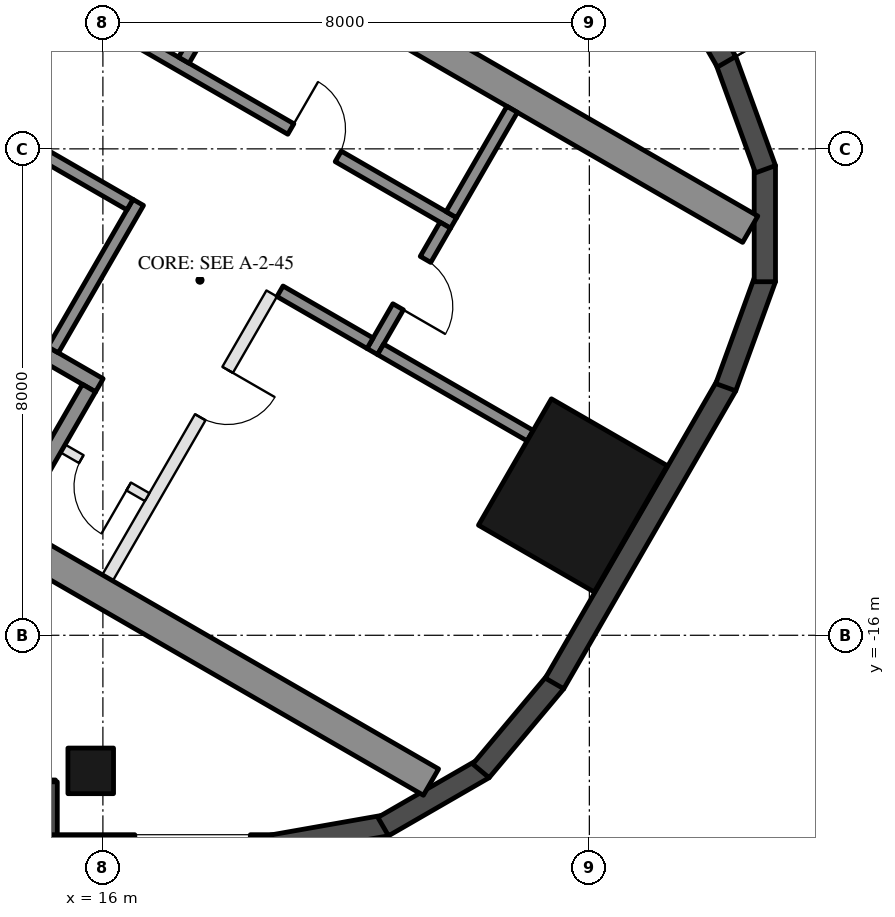
"""IFC4 building model, lengths in metres.
Left out: names, types, materials, properties, quantities, classifications, styles, units other than length and angle.
Written with IfcOpenShell. Run it as: python <this file> out.ifc"""

import sys

from ifc_helpers import new_model, si_unit, direction, frame, frame_2d, origin, origin_2d, place, context, subcontext, project, spatial, rectangle, hollow_rectangle, extrude, element, fill, save


model = new_model("IFC4")
c1 = context("Model", 3, precision=1e-05, world=origin(), true_north=direction((0.0, 1.0)))
c2 = subcontext(c1, "Body", "Model", "MODEL_VIEW")
j1 = project(units=[si_unit("LENGTHUNIT", "METRE"), si_unit("PLANEANGLEUNIT", "RADIAN")], contexts=[c1])
p1 = place(None, origin())
s1 = spatial("IfcSite", under=j1, at=p1, CompositionType="ELEMENT")
p2 = place(p1, origin())
s2 = spatial("IfcBuilding", under=s1, at=p2, CompositionType="ELEMENT")
p3 = place(p2, frame((0.0, 0.0, 191.0)))
s3 = spatial("IfcBuildingStorey", under=s2, at=p3, CompositionType="ELEMENT", Elevation=191.0)
p4 = place(p3, frame((15.8, -18.23, 0.0), z_axis=(0.0, 0.0, 1.0), x_axis=(-1.0, 0.0, 0.0)))
e1 = element("IfcColumn", 1, at=p4, inside=s3, PredefinedType="COLUMN", context=c2, shape_type="SweptSolid", body=[
    extrude(hollow_rectangle(XDim=0.75, YDim=0.75, WallThickness=0.035, at=origin_2d()), origin(), (0.0, 0.0, 1.0), 3.7),
])
p5 = place(p3, frame((23.729, -13.7, 0.0), z_axis=(0.0, 0.0, 1.0), x_axis=(0.5, 0.866025403784, 0.0)))
e2 = element("IfcColumn", 2, at=p5, inside=s3, PredefinedType="COLUMN", context=c2, shape_type="SweptSolid", body=[
    extrude(hollow_rectangle(XDim=2.4, YDim=2.2, WallThickness=0.06, at=origin_2d()), origin(), (0.0, 0.0, 1.0), 3.7),
])
p6 = place(p3, frame((8.48, -18.555, 0.0), z_axis=(0.0, 0.0, 1.0), x_axis=(1.0, 0.0, 0.0)))
e3 = element("IfcWall", 3, at=p6, inside=s3, PredefinedType="SOLIDWALL", context=c2, shape_type="SweptSolid", body=[
    extrude(rectangle(XDim=6.74, YDim=0.35, at=frame_2d((3.37, 0.0))), origin(), (0.0, 0.0, 1.0), 3.55),
])
p7 = place(p6, frame((0.32, 0.0, 0.0)))
e4 = element("IfcOpeningElement", 4, at=p7, cuts=e3, PredefinedType="OPENING", context=c2, shape_type="SweptSolid", body=[
    extrude(rectangle(XDim=2.4, YDim=2.4, at=frame_2d((1.2, 1.2))), frame((0.0, 0.185, 0.0), z_axis=(0.0, -1.0, 0.0), x_axis=(1.0, 0.0, 0.0)), (0.0, 0.0, 1.0), 0.37),
])
p8 = place(p6, frame((3.02, 0.0, 0.3)))
e5 = element("IfcOpeningElement", 5, at=p8, cuts=e3, PredefinedType="OPENING", context=c2, shape_type="SweptSolid", body=[
    extrude(rectangle(XDim=2.9, YDim=2.65, at=frame_2d((1.45, 1.325))), frame((0.0, 0.185, 0.0), z_axis=(0.0, -1.0, 0.0), x_axis=(1.0, 0.0, 0.0)), (0.0, 0.0, 1.0), 0.37),
])
p9 = place(p3, frame((15.075, -18.41, 0.0), z_axis=(0.0, 0.0, 1.0), x_axis=(0.0, -1.0, 0.0)))
e6 = element("IfcWall", 6, at=p9, inside=s3, PredefinedType="SOLIDWALL", context=c2, shape_type="SweptSolid", body=[
    extrude(rectangle(XDim=1.22, YDim=0.35, at=frame_2d((0.61, 0.0))), origin(), (0.0, 0.0, 1.0), 3.55),
])
p10 = place(p3, frame((14.9, -19.455, 0.0), z_axis=(0.0, 0.0, 1.0), x_axis=(1.0, 0.0, 0.0)))
e7 = element("IfcWall", 7, at=p10, inside=s3, PredefinedType="SOLIDWALL", context=c2, shape_type="SweptSolid", body=[
    extrude(rectangle(XDim=3.916, YDim=0.35, at=frame_2d((1.958, 0.0))), origin(), (0.0, 0.0, 1.0), 3.55),
])
p11 = place(p10, frame((1.625, 0.0, 0.3)))
e8 = element("IfcOpeningElement", 8, at=p11, cuts=e7, PredefinedType="OPENING", context=c2, shape_type="SweptSolid", body=[
    extrude(rectangle(XDim=1.9, YDim=2.65, at=frame_2d((0.95, 1.325))), frame((0.0, 0.185, 0.0), z_axis=(0.0, -1.0, 0.0), x_axis=(1.0, 0.0, 0.0)), (0.0, 0.0, 1.0), 0.37),
])
p12 = place(p3, frame((18.785, -19.458, 0.0), z_axis=(0.0, 0.0, 1.0), x_axis=(0.984798995425, 0.173697837091, 0.0)))
e9 = element("IfcWall", 9, at=p12, inside=s3, PredefinedType="SOLIDWALL", context=c2, shape_type="SweptSolid", body=[
    extrude(rectangle(XDim=1.91, YDim=0.35, at=frame_2d((0.955, 0.0))), origin(), (0.0, 0.0, 1.0), 3.55),
])
for number, where, z_axis, x_axis in (
    (10, (20.61, -19.147, 0.0), (0.0, 0.0, 1.0), (0.866, 0.5, 0.0)),
    (11, (22.217, -18.231, 0.0), (0.0, 0.0, 1.0), (0.643, 0.766, 0.0)),
):
    element("IfcWall", number, at=place(p3, frame(where, z_axis=z_axis, x_axis=x_axis)), inside=s3, PredefinedType="SOLIDWALL", context=c2, shape_type="SweptSolid", body=[
        extrude(rectangle(XDim=1.91, YDim=0.35, at=frame_2d((0.955, 0.0))), origin(), (0.0, 0.0, 1.0), 3.55),
    ])
p13 = place(p3, frame((23.427, -16.792, 0.0), z_axis=(0.0, 0.0, 1.0), x_axis=(0.500018773155, 0.866014564827, 0.0)))
e12 = element("IfcWall", 12, at=p13, inside=s3, PredefinedType="SOLIDWALL", context=c2, shape_type="SweptSolid", body=[
    extrude(rectangle(XDim=5.658, YDim=0.35, at=frame_2d((2.829, 0.0))), origin(), (0.0, 0.0, 1.0), 3.55),
])
for number, where, z_axis, x_axis in (
    (13, (26.244, -11.92, 0.0), (0.0, 0.0, 1.0), (0.342, 0.94, 0.0)),
    (14, (26.886, -10.185, 0.0), (0.0, 0.0, 1.0), (0.0, 1.0, 0.0)),
    (15, (26.897, -8.335, 0.0), (0.0, 0.0, 1.0), (-0.342, 0.94, 0.0)),
):
    element("IfcWall", number, at=place(p3, frame(where, z_axis=z_axis, x_axis=x_axis)), inside=s3, PredefinedType="SOLIDWALL", context=c2, shape_type="SweptSolid", body=[
        extrude(rectangle(XDim=1.91, YDim=0.35, at=frame_2d((0.955, 0.0))), origin(), (0.0, 0.0, 1.0), 3.55),
    ])
p14 = place(p3, frame((26.257, -6.567, 0.0), z_axis=(0.0, 0.0, 1.0), x_axis=(-0.500023526245, 0.866011820475, 0.0)))
e16 = element("IfcWall", 16, at=p14, inside=s3, PredefinedType="SOLIDWALL", context=c2, shape_type="SweptSolid", body=[
    extrude(rectangle(XDim=11.816, YDim=0.35, at=frame_2d((5.908, 0.0))), origin(), (0.0, 0.0, 1.0), 3.55),
])
p15 = place(p14, frame((0.38, 0.0, 0.3)))
e17 = element("IfcOpeningElement", 17, at=p15, cuts=e16, PredefinedType="OPENING", context=c2, shape_type="SweptSolid", body=[
    extrude(rectangle(XDim=1.9, YDim=2.65, at=frame_2d((0.95, 1.325))), frame((0.0, 0.185, 0.0), z_axis=(0.0, -1.0, 0.0), x_axis=(1.0, 0.0, 0.0)), (0.0, 0.0, 1.0), 0.37),
])
p16 = place(p14, frame((7.791, 0.0, 0.0)))
e18 = element("IfcOpeningElement", 18, at=p16, cuts=e16, PredefinedType="OPENING", context=c2, shape_type="SweptSolid", body=[
    extrude(rectangle(XDim=2.4, YDim=2.4, at=frame_2d((1.2, 1.2))), frame((0.0, 0.185, 0.0), z_axis=(0.0, -1.0, 0.0), x_axis=(1.0, 0.0, 0.0)), (0.0, 0.0, 1.0), 0.37),
])
p17 = place(p14, frame((3.741, 0.0, 0.3)))
e19 = element("IfcOpeningElement", 19, at=p17, cuts=e16, PredefinedType="OPENING", context=c2, shape_type="SweptSolid", body=[
    extrude(rectangle(XDim=1.7, YDim=2.65, at=frame_2d((0.85, 1.325))), frame((0.0, 0.185, 0.0), z_axis=(0.0, -1.0, 0.0), x_axis=(1.0, 0.0, 0.0)), (0.0, 0.0, 1.0), 0.37),
])
p18 = place(p14, frame((5.741, 0.0, 0.3)))
e20 = element("IfcOpeningElement", 20, at=p18, cuts=e16, PredefinedType="OPENING", context=c2, shape_type="SweptSolid", body=[
    extrude(rectangle(XDim=1.7, YDim=2.65, at=frame_2d((0.85, 1.325))), frame((0.0, 0.185, 0.0), z_axis=(0.0, -1.0, 0.0), x_axis=(1.0, 0.0, 0.0)), (0.0, 0.0, 1.0), 0.37),
])
for number, where, z_axis, x_axis in (
    (21, (8.547, -10.997, 0.0), (0.0, 0.0, 1.0), (0.866, -0.5, 0.0)),
    (22, (13.797, -1.903, 0.0), (0.0, 0.0, 1.0), (0.866, -0.5, 0.0)),
):
    element("IfcWall", number, at=place(p3, frame(where, z_axis=z_axis, x_axis=x_axis)), inside=s3, PredefinedType="SHEAR", context=c2, shape_type="SweptSolid", body=[
        extrude(rectangle(XDim=14.837, YDim=0.5, at=frame_2d((7.418, 0.0))), origin(), (0.0, 0.0, 1.0), 3.5),
    ])
p19 = place(p3, frame((10.356, -8.664, 0.0), z_axis=(0.0, 0.0, 1.0), x_axis=(0.866028629588, -0.499994412703, 0.0)))
e23 = element("IfcWall", 23, at=p19, inside=s3, PredefinedType="SHEAR", context=c2, shape_type="SweptSolid", body=[
    extrude(rectangle(XDim=6.45, YDim=0.25, at=frame_2d((3.225, 0.0))), origin(), (0.0, 0.0, 1.0), 3.5),
])
p20 = place(p19, frame((0.3, 0.0, 0.0)))
e24 = element("IfcOpeningElement", 24, at=p20, cuts=e23, PredefinedType="OPENING", context=c2, shape_type="SweptSolid", body=[
    extrude(rectangle(XDim=1.0, YDim=2.1, at=frame_2d((0.5, 1.05))), frame((0.0, 0.135, 0.0), z_axis=(0.0, -1.0, 0.0), x_axis=(1.0, 0.0, 0.0)), (0.0, 0.0, 1.0), 0.27),
])
p21 = place(p3, frame((14.496, -14.143, 0.0), z_axis=(0.0, 0.0, 1.0), x_axis=(0.500062241894, 0.865989465428, 0.0)))
e25 = element("IfcWall", 25, at=p21, inside=s3, PredefinedType="SHEAR", context=c2, shape_type="SweptSolid", body=[
    extrude(rectangle(XDim=2.55, YDim=0.25, at=frame_2d((1.275, 0.0))), origin(), (0.0, 0.0, 1.0), 3.5),
])
p22 = place(p3, frame((15.181, -11.305, 0.0), z_axis=(0.0, 0.0, 1.0), x_axis=(0.49994636267, 0.866056369097, 0.0)))
e26 = element("IfcWall", 26, at=p22, inside=s3, PredefinedType="SHEAR", context=c2, shape_type="SweptSolid", body=[
    extrude(rectangle(XDim=2.8, YDim=0.2, at=frame_2d((1.4, 0.0))), origin(), (0.0, 0.0, 1.0), 3.5),
])
p23 = place(p3, frame((14.02, -7.517, 0.0), z_axis=(0.0, 0.0, 1.0), x_axis=(0.866034573852, -0.49998411664, 0.0)))
e27 = element("IfcWall", 27, at=p23, inside=s3, PredefinedType="SHEAR", context=c2, shape_type="SweptSolid", body=[
    extrude(rectangle(XDim=2.8, YDim=0.2, at=frame_2d((1.4, 0.0))), origin(), (0.0, 0.0, 1.0), 3.5),
])
p24 = place(p3, frame((12.968, -4.138, 0.0), z_axis=(0.0, 0.0, 1.0), x_axis=(0.866028328073, -0.49999493495, 0.0)))
e28 = element("IfcWall", 28, at=p24, inside=s3, PredefinedType="SHEAR", context=c2, shape_type="SweptSolid", body=[
    extrude(rectangle(XDim=10.16, YDim=0.2, at=frame_2d((5.08, 0.0))), origin(), (0.0, 0.0, 1.0), 3.5),
])
p25 = place(p24, frame((1.99, 0.0, 0.0)))
e29 = element("IfcOpeningElement", 29, at=p25, cuts=e28, PredefinedType="OPENING", context=c2, shape_type="SweptSolid", body=[
    extrude(rectangle(XDim=0.9, YDim=2.1, at=frame_2d((0.45, 1.05))), frame((0.0, 0.11, 0.0), z_axis=(0.0, -1.0, 0.0), x_axis=(1.0, 0.0, 0.0)), (0.0, 0.0, 1.0), 0.22),
])
p26 = place(p24, frame((7.07, 0.0, 0.0)))
e30 = element("IfcOpeningElement", 30, at=p26, cuts=e28, PredefinedType="OPENING", context=c2, shape_type="SweptSolid", body=[
    extrude(rectangle(XDim=0.9, YDim=2.1, at=frame_2d((0.45, 1.05))), frame((0.0, 0.11, 0.0), z_axis=(0.0, -1.0, 0.0), x_axis=(1.0, 0.0, 0.0)), (0.0, 0.0, 1.0), 0.22),
])
p27 = place(p3, frame((20.43, -11.333, 0.0), z_axis=(0.0, 0.0, 1.0), x_axis=(0.500001309137, 0.866024647952, 0.0)))
e31 = element("IfcWall", 31, at=p27, inside=s3, PredefinedType="SHEAR", context=c2, shape_type="SweptSolid", body=[
    extrude(rectangle(XDim=2.4, YDim=0.2, at=frame_2d((1.2, 0.0))), origin(), (0.0, 0.0, 1.0), 3.5),
])
p28 = place(p27, frame((0.85, 0.0, 0.0)))
e32 = element("IfcOpeningElement", 32, at=p28, cuts=e31, PredefinedType="OPENING", context=c2, shape_type="SweptSolid", body=[
    extrude(rectangle(XDim=0.9, YDim=2.1, at=frame_2d((0.45, 1.05))), frame((0.0, 0.11, 0.0), z_axis=(0.0, -1.0, 0.0), x_axis=(1.0, 0.0, 0.0)), (0.0, 0.0, 1.0), 0.22),
])
p29 = place(p3, frame((18.913, -10.342, 0.0), z_axis=(0.0, 0.0, 1.0), x_axis=(0.866038183914, -0.499977863513, 0.0)))
e33 = element("IfcWall", 33, at=p29, inside=s3, PredefinedType="SHEAR", context=c2, shape_type="SweptSolid", body=[
    extrude(rectangle(XDim=1.71, YDim=0.2, at=frame_2d((0.855, 0.0))), origin(), (0.0, 0.0, 1.0), 3.5),
])
for number, where, z_axis, x_axis in (
    (34, (17.331, -6.542, 0.0), (0.0, 0.0, 1.0), (0.5, 0.866, 0.0)),
    (35, (21.73, -9.082, 0.0), (0.0, 0.0, 1.0), (0.5, 0.866, 0.0)),
):
    element("IfcWall", number, at=place(p3, frame(where, z_axis=z_axis, x_axis=x_axis)), inside=s3, PredefinedType="SHEAR", context=c2, shape_type="SweptSolid", body=[
        extrude(rectangle(XDim=2.0, YDim=0.2, at=frame_2d((1.0, 0.0))), origin(), (0.0, 0.0, 1.0), 3.5),
    ])
p30 = place(p3, frame((20.567, -11.297, 0.0), z_axis=(0.0, 0.0, 1.0), x_axis=(0.866055327414, -0.49994816717, 0.0)))
e36 = element("IfcWall", 36, at=p30, inside=s3, PredefinedType="SHEAR", context=c2, shape_type="SweptSolid", body=[
    extrude(rectangle(XDim=2.84, YDim=0.2, at=frame_2d((1.42, 0.0))), origin(), (0.0, 0.0, 1.0), 3.5),
])
p31 = place(p3, frame((16.076, -15.055, 0.0), z_axis=(0.0, 0.0, 1.0), x_axis=(0.499995103361, 0.866028230842, 0.0)))
e37 = element("IfcWall", 37, at=p31, inside=s3, PredefinedType="PARTITIONING", context=c2, shape_type="SweptSolid", body=[
    extrude(rectangle(XDim=5.4, YDim=0.2, at=frame_2d((2.7, 0.0))), origin(), (0.0, 0.0, 1.0), 3.5),
])
p32 = place(p31, frame((3.05, 0.0, 0.0)))
e38 = element("IfcOpeningElement", 38, at=p32, cuts=e37, PredefinedType="OPENING", context=c2, shape_type="SweptSolid", body=[
    extrude(rectangle(XDim=0.9, YDim=2.1, at=frame_2d((0.45, 1.05))), frame((0.0, 0.11, 0.0), z_axis=(0.0, -1.0, 0.0), x_axis=(1.0, 0.0, 0.0)), (0.0, 0.0, 1.0), 0.22),
])
p33 = place(p3, frame((15.342, -12.928, 0.0), z_axis=(0.0, 0.0, 1.0), x_axis=(0.865989903783, -0.500061482766, 0.0)))
e39 = element("IfcWall", 39, at=p33, inside=s3, PredefinedType="PARTITIONING", context=c2, shape_type="SweptSolid", body=[
    extrude(rectangle(XDim=1.6, YDim=0.15, at=frame_2d((0.8, 0.0))), origin(), (0.0, 0.0, 1.0), 3.5),
])
p34 = place(p33, frame((0.35, 0.0, 0.0)))
e40 = element("IfcOpeningElement", 40, at=p34, cuts=e39, PredefinedType="OPENING", context=c2, shape_type="SweptSolid", body=[
    extrude(rectangle(XDim=0.9, YDim=2.1, at=frame_2d((0.45, 1.05))), frame((0.0, 0.085, 0.0), z_axis=(0.0, -1.0, 0.0), x_axis=(1.0, 0.0, 0.0)), (0.0, 0.0, 1.0), 0.17),
])
p35 = place(p34, frame((0.9, 0.0, 0.0), z_axis=(0.0, 0.0, 1.0), x_axis=(-1.0, 0.0, 0.0)))
e41 = element("IfcDoor", 41, at=p35, inside=s3, OperationType="SINGLE_SWING_LEFT", PredefinedType="DOOR", context=c2, shape_type="SweptSolid", body=[
    extrude(rectangle(XDim=0.9, YDim=2.1, at=frame_2d((0.45, 1.05))), frame((0.0, 0.025, 0.0), z_axis=(0.0, -1.0, 0.0), x_axis=(1.0, 0.0, 0.0)), (0.0, 0.0, 1.0), 0.05),
])
fill(e40, e41)
p36 = place(p26, origin())
e42 = element("IfcDoor", 42, at=p36, inside=s3, OperationType="SINGLE_SWING_LEFT", PredefinedType="DOOR", context=c2, shape_type="SweptSolid", body=[
    extrude(rectangle(XDim=0.9, YDim=2.1, at=frame_2d((0.45, 1.05))), frame((0.0, 0.025, 0.0), z_axis=(0.0, -1.0, 0.0), x_axis=(1.0, 0.0, 0.0)), (0.0, 0.0, 1.0), 0.05),
])
fill(e30, e42)
p37 = place(p28, frame((0.9, 0.0, 0.0), z_axis=(0.0, 0.0, 1.0), x_axis=(-1.0, 0.0, 0.0)))
e43 = element("IfcDoor", 43, at=p37, inside=s3, OperationType="SINGLE_SWING_RIGHT", PredefinedType="DOOR", context=c2, shape_type="SweptSolid", body=[
    extrude(rectangle(XDim=0.9, YDim=2.1, at=frame_2d((0.45, 1.05))), frame((0.0, 0.025, 0.0), z_axis=(0.0, -1.0, 0.0), x_axis=(1.0, 0.0, 0.0)), (0.0, 0.0, 1.0), 0.05),
])
fill(e32, e43)
p38 = place(p32, frame((0.9, 0.0, 0.0), z_axis=(0.0, 0.0, 1.0), x_axis=(-1.0, 0.0, 0.0)))
e44 = element("IfcDoor", 44, at=p38, inside=s3, OperationType="SINGLE_SWING_LEFT", PredefinedType="DOOR", context=c2, shape_type="SweptSolid", body=[
    extrude(rectangle(XDim=0.9, YDim=2.1, at=frame_2d((0.45, 1.05))), frame((0.0, 0.025, 0.0), z_axis=(0.0, -1.0, 0.0), x_axis=(1.0, 0.0, 0.0)), (0.0, 0.0, 1.0), 0.05),
])
fill(e38, e44)
save(model, sys.argv[1])
